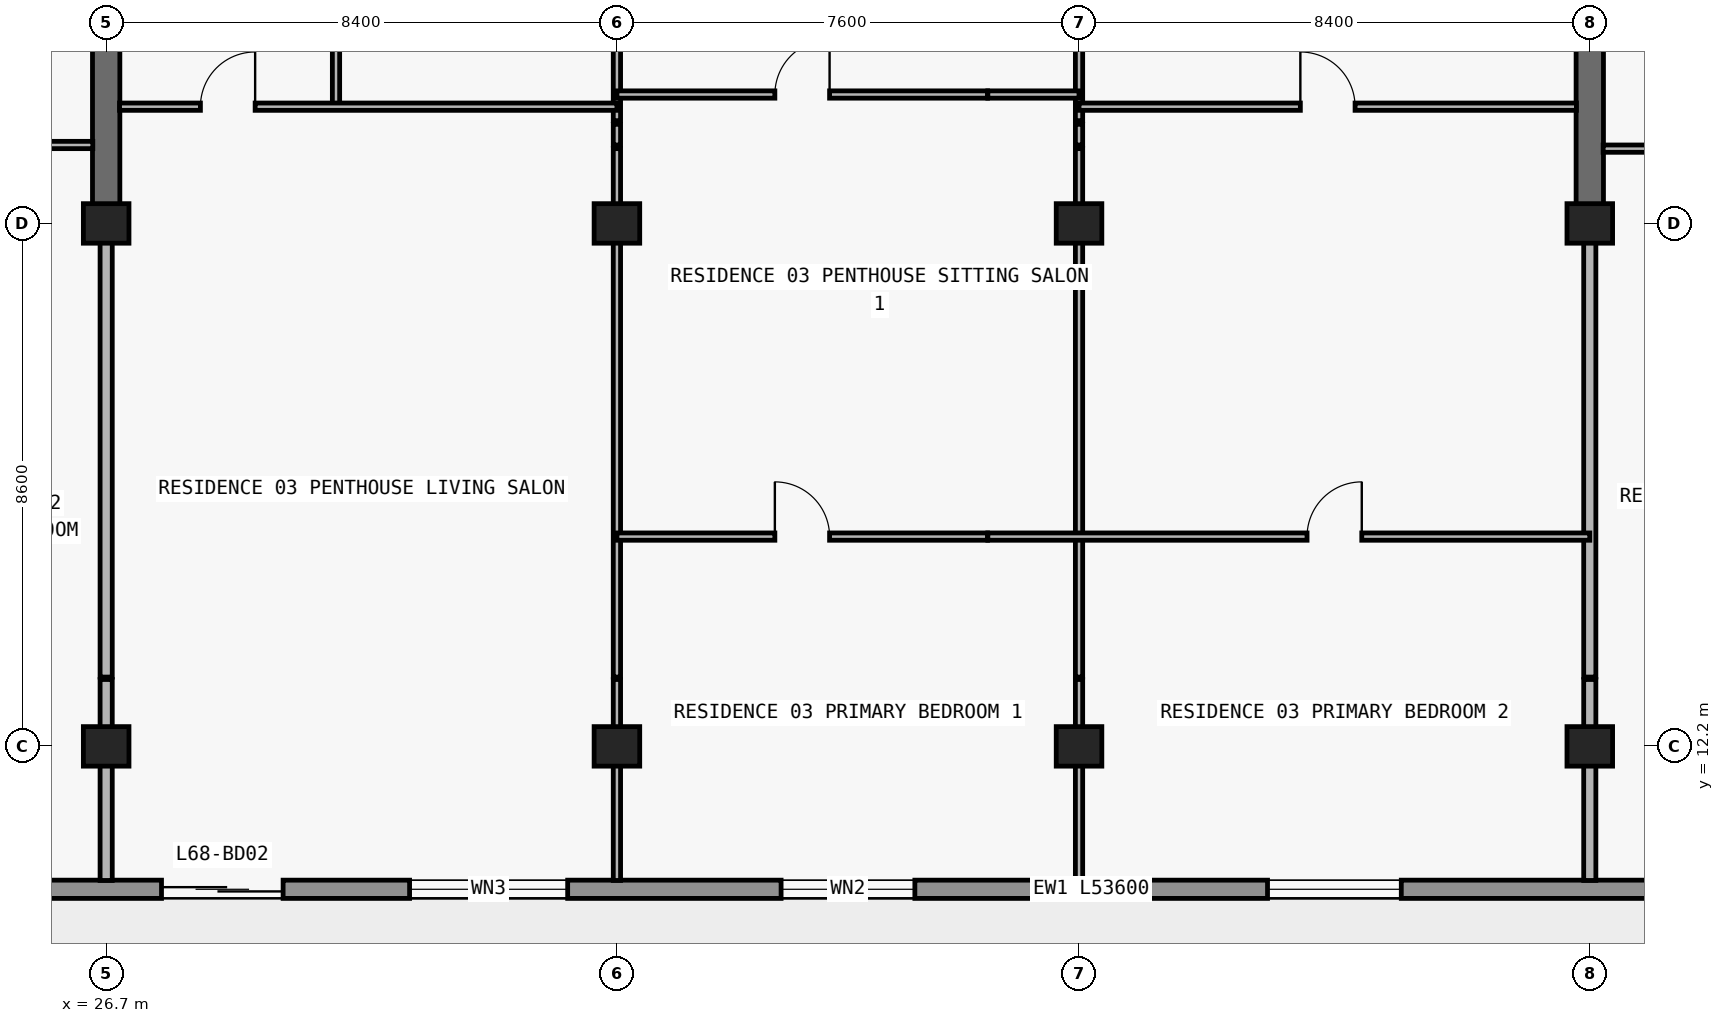
"""IFC4 building model, lengths in metres.
Left out: names, types, materials, properties, quantities, classifications, styles, units other than length and angle.
Written with IfcOpenShell. Run it as: python <this file> out.ifc"""

import sys

from ifc_helpers import new_model, si_unit, direction, frame, frame_2d, origin, origin_2d, place, context, subcontext, project, spatial, rectangle, extrude, element, fill, save


model = new_model("IFC4")
c1 = context("Model", 3, precision=1e-05, world=origin(), true_north=direction((0.0, 1.0)))
c2 = subcontext(c1, "Body", "Model", "MODEL_VIEW")
j1 = project(units=[si_unit("LENGTHUNIT", "METRE"), si_unit("PLANEANGLEUNIT", "RADIAN")], contexts=[c1])
p1 = place(None, origin())
s1 = spatial("IfcSite", under=j1, at=p1, CompositionType="ELEMENT")
p2 = place(p1, origin())
s2 = spatial("IfcBuilding", under=s1, at=p2, CompositionType="ELEMENT")
p3 = place(p2, frame((0.0, 0.0, 243.0)))
s3 = spatial("IfcBuildingStorey", under=s2, at=p3, CompositionType="ELEMENT", Elevation=243.0)
for number, where, z_axis, x_axis in (
    (1, (26.7, 12.2, 0.0), (0.0, 0.0, 1.0), (1.0, 0.0, 0.0)),
    (2, (35.1, 12.2, 0.0), (0.0, 0.0, 1.0), (1.0, 0.0, 0.0)),
    (3, (42.7, 12.2, 0.0), (0.0, 0.0, 1.0), (1.0, 0.0, 0.0)),
    (4, (51.1, 12.2, 0.0), (0.0, 0.0, 1.0), (1.0, 0.0, 0.0)),
    (5, (26.7, 20.8, 0.0), (0.0, 0.0, 1.0), (1.0, 0.0, 0.0)),
    (6, (35.1, 20.8, 0.0), (0.0, 0.0, 1.0), (1.0, 0.0, 0.0)),
    (7, (42.7, 20.8, 0.0), (0.0, 0.0, 1.0), (1.0, 0.0, 0.0)),
    (8, (51.1, 20.8, 0.0), (0.0, 0.0, 1.0), (1.0, 0.0, 0.0)),
):
    element("IfcColumn", number, at=place(p3, frame(where, z_axis=z_axis, x_axis=x_axis)), inside=s3, PredefinedType="COLUMN", context=c2, shape_type="SweptSolid", body=[
        extrude(rectangle(XDim=0.75, YDim=0.65, at=origin_2d()), origin(), (0.0, 0.0, 1.0), 3.05),
    ])
for number, where, z_axis, x_axis in (
    (9, (26.7, 20.8, 0.0), (0.0, 0.0, 1.0), (0.0, 1.0, 0.0)),
    (10, (51.1, 20.8, 0.0), (0.0, 0.0, 1.0), (0.0, 1.0, 0.0)),
):
    element("IfcWall", number, at=place(p3, frame(where, z_axis=z_axis, x_axis=x_axis)), inside=s3, PredefinedType="SHEAR", context=c2, shape_type="SweptSolid", body=[
        extrude(rectangle(XDim=8.6, YDim=0.45, at=frame_2d((4.3, 0.0))), origin(), (0.0, 0.0, 1.0), 3.05),
    ])
p4 = place(p3, frame((65.7, 9.85, 0.0), z_axis=(0.0, 0.0, 1.0), x_axis=(-1.0, 0.0, 0.0)))
e11 = element("IfcWall", 11, at=p4, inside=s3, PredefinedType="STANDARD", context=c2, shape_type="SweptSolid", body=[
    extrude(rectangle(XDim=53.6, YDim=0.3, at=frame_2d((26.8, 0.0))), origin(), (0.0, 0.0, 1.0), 3.05),
])
p5 = place(p4, frame((48.05, 0.0, 0.85)))
e12 = element("IfcOpeningElement", 12, at=p5, cuts=e11, PredefinedType="OPENING", context=c2, shape_type="SweptSolid", body=[
    extrude(rectangle(XDim=1.8, YDim=1.55, at=frame_2d((0.9, 0.775))), frame((0.0, 0.16, 0.0), z_axis=(0.0, -1.0, 0.0), x_axis=(1.0, 0.0, 0.0)), (0.0, 0.0, 1.0), 0.32),
])
p6 = place(p4, frame((44.09, 0.0, 0.0)))
e13 = element("IfcOpeningElement", 13, at=p6, cuts=e11, PredefinedType="OPENING", context=c2, shape_type="SweptSolid", body=[
    extrude(rectangle(XDim=2.0, YDim=2.3, at=frame_2d((1.0, 1.15))), frame((0.0, 0.16, 0.0), z_axis=(0.0, -1.0, 0.0), x_axis=(1.0, 0.0, 0.0)), (0.0, 0.0, 1.0), 0.32),
])
p7 = place(p4, frame((39.99, 0.0, 0.85)))
e14 = element("IfcOpeningElement", 14, at=p7, cuts=e11, PredefinedType="OPENING", context=c2, shape_type="SweptSolid", body=[
    extrude(rectangle(XDim=1.8, YDim=1.55, at=frame_2d((0.9, 0.775))), frame((0.0, 0.16, 0.0), z_axis=(0.0, -1.0, 0.0), x_axis=(1.0, 0.0, 0.0)), (0.0, 0.0, 1.0), 0.32),
])
p8 = place(p4, frame((36.09, 0.0, 0.0)))
e15 = element("IfcOpeningElement", 15, at=p8, cuts=e11, PredefinedType="OPENING", context=c2, shape_type="SweptSolid", body=[
    extrude(rectangle(XDim=2.0, YDim=2.3, at=frame_2d((1.0, 1.15))), frame((0.0, 0.16, 0.0), z_axis=(0.0, -1.0, 0.0), x_axis=(1.0, 0.0, 0.0)), (0.0, 0.0, 1.0), 0.32),
])
p9 = place(p4, frame((31.41, 0.0, 0.65)))
e16 = element("IfcOpeningElement", 16, at=p9, cuts=e11, PredefinedType="OPENING", context=c2, shape_type="SweptSolid", body=[
    extrude(rectangle(XDim=2.6, YDim=1.85, at=frame_2d((1.3, 0.925))), frame((0.0, 0.16, 0.0), z_axis=(0.0, -1.0, 0.0), x_axis=(1.0, 0.0, 0.0)), (0.0, 0.0, 1.0), 0.32),
])
p10 = place(p4, frame((25.7, 0.0, 0.85)))
e17 = element("IfcOpeningElement", 17, at=p10, cuts=e11, PredefinedType="OPENING", context=c2, shape_type="SweptSolid", body=[
    extrude(rectangle(XDim=2.2, YDim=1.55, at=frame_2d((1.1, 0.775))), frame((0.0, 0.16, 0.0), z_axis=(0.0, -1.0, 0.0), x_axis=(1.0, 0.0, 0.0)), (0.0, 0.0, 1.0), 0.32),
])
p11 = place(p4, frame((17.7, 0.0, 0.85)))
e18 = element("IfcOpeningElement", 18, at=p11, cuts=e11, PredefinedType="OPENING", context=c2, shape_type="SweptSolid", body=[
    extrude(rectangle(XDim=2.2, YDim=1.55, at=frame_2d((1.1, 0.775))), frame((0.0, 0.16, 0.0), z_axis=(0.0, -1.0, 0.0), x_axis=(1.0, 0.0, 0.0)), (0.0, 0.0, 1.0), 0.32),
])
p12 = place(p4, frame((11.29, 0.0, 0.0)))
e19 = element("IfcOpeningElement", 19, at=p12, cuts=e11, PredefinedType="OPENING", context=c2, shape_type="SweptSolid", body=[
    extrude(rectangle(XDim=2.0, YDim=2.3, at=frame_2d((1.0, 1.15))), frame((0.0, 0.16, 0.0), z_axis=(0.0, -1.0, 0.0), x_axis=(1.0, 0.0, 0.0)), (0.0, 0.0, 1.0), 0.32),
])
p13 = place(p4, frame((7.19, 0.0, 0.85)))
e20 = element("IfcOpeningElement", 20, at=p13, cuts=e11, PredefinedType="OPENING", context=c2, shape_type="SweptSolid", body=[
    extrude(rectangle(XDim=1.8, YDim=1.55, at=frame_2d((0.9, 0.775))), frame((0.0, 0.16, 0.0), z_axis=(0.0, -1.0, 0.0), x_axis=(1.0, 0.0, 0.0)), (0.0, 0.0, 1.0), 0.32),
])
p14 = place(p4, frame((0.65, 0.0, 0.85)))
e21 = element("IfcOpeningElement", 21, at=p14, cuts=e11, PredefinedType="OPENING", context=c2, shape_type="SweptSolid", body=[
    extrude(rectangle(XDim=1.8, YDim=1.55, at=frame_2d((0.9, 0.775))), frame((0.0, 0.16, 0.0), z_axis=(0.0, -1.0, 0.0), x_axis=(1.0, 0.0, 0.0)), (0.0, 0.0, 1.0), 0.32),
])
p15 = place(p3, frame((26.7, 9.995, 0.0), z_axis=(0.0, 0.0, 1.0), x_axis=(0.0, 1.0, 0.0)))
e22 = element("IfcWall", 22, at=p15, inside=s3, PredefinedType="PARTITIONING", context=c2, shape_type="SweptSolid", body=[
    extrude(rectangle(XDim=3.305, YDim=0.2, at=frame_2d((1.652, 0.0))), origin(), (0.0, 0.0, 1.0), 2.263),
])
p16 = place(p3, frame((26.7, 13.34, 0.0), z_axis=(0.0, 0.0, 1.0), x_axis=(0.0, 1.0, 0.0)))
e23 = element("IfcWall", 23, at=p16, inside=s3, PredefinedType="PARTITIONING", context=c2, shape_type="SweptSolid", body=[
    extrude(rectangle(XDim=7.455, YDim=0.2, at=frame_2d((3.728, 0.0))), origin(), (0.0, 0.0, 1.0), 2.263),
])
p17 = place(p3, frame((30.48, 22.72, 0.0), z_axis=(0.0, 0.0, 1.0), x_axis=(0.0, 1.0, 0.0)))
e24 = element("IfcWall", 24, at=p17, inside=s3, PredefinedType="PARTITIONING", context=c2, shape_type="SweptSolid", body=[
    extrude(rectangle(XDim=4.46, YDim=0.12, at=frame_2d((2.23, 0.0))), origin(), (0.0, 0.0, 1.0), 3.05),
])
p18 = place(p17, frame((1.78, 0.0, 0.0)))
e25 = element("IfcOpeningElement", 25, at=p18, cuts=e24, PredefinedType="OPENING", context=c2, shape_type="SweptSolid", body=[
    extrude(rectangle(XDim=0.9, YDim=2.15, at=frame_2d((0.45, 1.075))), frame((0.0, 0.07, 0.0), z_axis=(0.0, -1.0, 0.0), x_axis=(1.0, 0.0, 0.0)), (0.0, 0.0, 1.0), 0.14),
])
p19 = place(p3, frame((35.1, 9.995, 0.0), z_axis=(0.0, 0.0, 1.0), x_axis=(0.0, 1.0, 0.0)))
e26 = element("IfcWall", 26, at=p19, inside=s3, PredefinedType="PARTITIONING", context=c2, shape_type="SweptSolid", body=[
    extrude(rectangle(XDim=3.305, YDim=0.12, at=frame_2d((1.652, 0.0))), origin(), (0.0, 0.0, 1.0), 2.263),
])
p20 = place(p3, frame((35.1, 13.34, 0.0), z_axis=(0.0, 0.0, 1.0), x_axis=(0.0, 1.0, 0.0)))
e27 = element("IfcWall", 27, at=p20, inside=s3, PredefinedType="PARTITIONING", context=c2, shape_type="SweptSolid", body=[
    extrude(rectangle(XDim=8.69, YDim=0.12, at=frame_2d((4.345, 0.0))), origin(), (0.0, 0.0, 1.0), 2.263),
])
p21 = place(p3, frame((35.1, 22.09, 0.0), z_axis=(0.0, 0.0, 1.0), x_axis=(0.0, 1.0, 0.0)))
e28 = element("IfcWall", 28, at=p21, inside=s3, PredefinedType="PARTITIONING", context=c2, shape_type="SweptSolid", body=[
    extrude(rectangle(XDim=0.34, YDim=0.12, at=frame_2d((0.17, 0.0))), origin(), (0.0, 0.0, 1.0), 2.263),
])
p22 = place(p3, frame((35.1, 22.49, 0.0), z_axis=(0.0, 0.0, 1.0), x_axis=(0.0, 1.0, 0.0)))
e29 = element("IfcWall", 29, at=p22, inside=s3, PredefinedType="PARTITIONING", context=c2, shape_type="SweptSolid", body=[
    extrude(rectangle(XDim=4.69, YDim=0.12, at=frame_2d((2.345, 0.0))), origin(), (0.0, 0.0, 1.0), 2.263),
])
p23 = place(p22, frame((2.11, 0.0, 0.0)))
e30 = element("IfcOpeningElement", 30, at=p23, cuts=e29, PredefinedType="OPENING", context=c2, shape_type="SweptSolid", body=[
    extrude(rectangle(XDim=0.9, YDim=2.15, at=frame_2d((0.45, 1.075))), frame((0.0, 0.07, 0.0), z_axis=(0.0, -1.0, 0.0), x_axis=(1.0, 0.0, 0.0)), (0.0, 0.0, 1.0), 0.14),
])
p24 = place(p3, frame((42.7, 9.995, 0.0), z_axis=(0.0, 0.0, 1.0), x_axis=(0.0, 1.0, 0.0)))
e31 = element("IfcWall", 31, at=p24, inside=s3, PredefinedType="PARTITIONING", context=c2, shape_type="SweptSolid", body=[
    extrude(rectangle(XDim=3.305, YDim=0.12, at=frame_2d((1.652, 0.0))), origin(), (0.0, 0.0, 1.0), 2.263),
])
p25 = place(p3, frame((42.7, 13.34, 0.0), z_axis=(0.0, 0.0, 1.0), x_axis=(0.0, 1.0, 0.0)))
e32 = element("IfcWall", 32, at=p25, inside=s3, PredefinedType="PARTITIONING", context=c2, shape_type="SweptSolid", body=[
    extrude(rectangle(XDim=8.69, YDim=0.12, at=frame_2d((4.345, 0.0))), origin(), (0.0, 0.0, 1.0), 2.263),
])
p26 = place(p3, frame((42.7, 22.09, 0.0), z_axis=(0.0, 0.0, 1.0), x_axis=(0.0, 1.0, 0.0)))
e33 = element("IfcWall", 33, at=p26, inside=s3, PredefinedType="PARTITIONING", context=c2, shape_type="SweptSolid", body=[
    extrude(rectangle(XDim=0.34, YDim=0.12, at=frame_2d((0.17, 0.0))), origin(), (0.0, 0.0, 1.0), 2.263),
])
p27 = place(p3, frame((42.7, 22.49, 0.0), z_axis=(0.0, 0.0, 1.0), x_axis=(0.0, 1.0, 0.0)))
e34 = element("IfcWall", 34, at=p27, inside=s3, PredefinedType="PARTITIONING", context=c2, shape_type="SweptSolid", body=[
    extrude(rectangle(XDim=4.69, YDim=0.12, at=frame_2d((2.345, 0.0))), origin(), (0.0, 0.0, 1.0), 2.263),
])
p28 = place(p27, frame((2.11, 0.0, 0.0)))
e35 = element("IfcOpeningElement", 35, at=p28, cuts=e34, PredefinedType="OPENING", context=c2, shape_type="SweptSolid", body=[
    extrude(rectangle(XDim=0.9, YDim=2.15, at=frame_2d((0.45, 1.075))), frame((0.0, 0.07, 0.0), z_axis=(0.0, -1.0, 0.0), x_axis=(1.0, 0.0, 0.0)), (0.0, 0.0, 1.0), 0.14),
])
p29 = place(p3, frame((51.1, 9.995, 0.0), z_axis=(0.0, 0.0, 1.0), x_axis=(0.0, 1.0, 0.0)))
e36 = element("IfcWall", 36, at=p29, inside=s3, PredefinedType="PARTITIONING", context=c2, shape_type="SweptSolid", body=[
    extrude(rectangle(XDim=3.305, YDim=0.2, at=frame_2d((1.652, 0.0))), origin(), (0.0, 0.0, 1.0), 2.263),
])
p30 = place(p3, frame((51.1, 13.34, 0.0), z_axis=(0.0, 0.0, 1.0), x_axis=(0.0, 1.0, 0.0)))
e37 = element("IfcWall", 37, at=p30, inside=s3, PredefinedType="PARTITIONING", context=c2, shape_type="SweptSolid", body=[
    extrude(rectangle(XDim=7.455, YDim=0.2, at=frame_2d((3.728, 0.0))), origin(), (0.0, 0.0, 1.0), 2.263),
])
p31 = place(p3, frame((35.1, 15.65, 0.0), z_axis=(0.0, 0.0, 1.0), x_axis=(1.0, 0.0, 0.0)))
e38 = element("IfcWall", 38, at=p31, inside=s3, PredefinedType="PARTITIONING", context=c2, shape_type="SweptSolid", body=[
    extrude(rectangle(XDim=6.095, YDim=0.12, at=frame_2d((3.047, 0.0))), origin(), (0.0, 0.0, 1.0), 3.05),
])
p32 = place(p31, frame((2.597, 0.0, 0.0)))
e39 = element("IfcOpeningElement", 39, at=p32, cuts=e38, PredefinedType="OPENING", context=c2, shape_type="SweptSolid", body=[
    extrude(rectangle(XDim=0.9, YDim=2.15, at=frame_2d((0.45, 1.075))), frame((0.0, 0.07, 0.0), z_axis=(0.0, -1.0, 0.0), x_axis=(1.0, 0.0, 0.0)), (0.0, 0.0, 1.0), 0.14),
])
p33 = place(p3, frame((41.2, 15.65, 0.0), z_axis=(0.0, 0.0, 1.0), x_axis=(1.0, 0.0, 0.0)))
e40 = element("IfcWall", 40, at=p33, inside=s3, PredefinedType="PARTITIONING", context=c2, shape_type="SweptSolid", body=[
    extrude(rectangle(XDim=9.9, YDim=0.12, at=frame_2d((4.95, 0.0))), origin(), (0.0, 0.0, 1.0), 3.05),
])
p34 = place(p33, frame((5.25, 0.0, 0.0)))
e41 = element("IfcOpeningElement", 41, at=p34, cuts=e40, PredefinedType="OPENING", context=c2, shape_type="SweptSolid", body=[
    extrude(rectangle(XDim=0.9, YDim=2.15, at=frame_2d((0.45, 1.075))), frame((0.0, 0.07, 0.0), z_axis=(0.0, -1.0, 0.0), x_axis=(1.0, 0.0, 0.0)), (0.0, 0.0, 1.0), 0.14),
])
p35 = place(p3, frame((51.32, 22.03, 0.0), z_axis=(0.0, 0.0, 1.0), x_axis=(1.0, 0.0, 0.0)))
e42 = element("IfcWall", 42, at=p35, inside=s3, PredefinedType="PARTITIONING", context=c2, shape_type="SweptSolid", body=[
    extrude(rectangle(XDim=8.18, YDim=0.12, at=frame_2d((4.09, 0.0))), origin(), (0.0, 0.0, 1.0), 3.05),
])
p36 = place(p35, frame((1.583, 0.0, 0.0)))
e43 = element("IfcOpeningElement", 43, at=p36, cuts=e42, PredefinedType="OPENING", context=c2, shape_type="SweptSolid", body=[
    extrude(rectangle(XDim=0.9, YDim=2.15, at=frame_2d((0.45, 1.075))), frame((0.0, 0.07, 0.0), z_axis=(0.0, -1.0, 0.0), x_axis=(1.0, 0.0, 0.0)), (0.0, 0.0, 1.0), 0.14),
])
p37 = place(p35, frame((5.84, 0.0, 0.0)))
e44 = element("IfcOpeningElement", 44, at=p37, cuts=e42, PredefinedType="OPENING", context=c2, shape_type="SweptSolid", body=[
    extrude(rectangle(XDim=0.9, YDim=2.15, at=frame_2d((0.45, 1.075))), frame((0.0, 0.07, 0.0), z_axis=(0.0, -1.0, 0.0), x_axis=(1.0, 0.0, 0.0)), (0.0, 0.0, 1.0), 0.14),
])
p38 = place(p3, frame((18.3, 22.09, 0.0), z_axis=(0.0, 0.0, 1.0), x_axis=(1.0, 0.0, 0.0)))
e45 = element("IfcWall", 45, at=p38, inside=s3, PredefinedType="PARTITIONING", context=c2, shape_type="SweptSolid", body=[
    extrude(rectangle(XDim=8.18, YDim=0.12, at=frame_2d((4.09, 0.0))), origin(), (0.0, 0.0, 1.0), 3.05),
])
p39 = place(p38, frame((1.818, 0.0, 0.0)))
e46 = element("IfcOpeningElement", 46, at=p39, cuts=e45, PredefinedType="OPENING", context=c2, shape_type="SweptSolid", body=[
    extrude(rectangle(XDim=0.9, YDim=2.15, at=frame_2d((0.45, 1.075))), frame((0.0, 0.07, 0.0), z_axis=(0.0, -1.0, 0.0), x_axis=(1.0, 0.0, 0.0)), (0.0, 0.0, 1.0), 0.14),
])
p40 = place(p38, frame((5.95, 0.0, 0.0)))
e47 = element("IfcOpeningElement", 47, at=p40, cuts=e45, PredefinedType="OPENING", context=c2, shape_type="SweptSolid", body=[
    extrude(rectangle(XDim=0.9, YDim=2.15, at=frame_2d((0.45, 1.075))), frame((0.0, 0.07, 0.0), z_axis=(0.0, -1.0, 0.0), x_axis=(1.0, 0.0, 0.0)), (0.0, 0.0, 1.0), 0.14),
])
p41 = place(p3, frame((26.92, 22.72, 0.0), z_axis=(0.0, 0.0, 1.0), x_axis=(1.0, 0.0, 0.0)))
e48 = element("IfcWall", 48, at=p41, inside=s3, PredefinedType="PARTITIONING", context=c2, shape_type="SweptSolid", body=[
    extrude(rectangle(XDim=8.18, YDim=0.12, at=frame_2d((4.09, 0.0))), origin(), (0.0, 0.0, 1.0), 3.05),
])
p42 = place(p41, frame((1.33, 0.0, 0.0)))
e49 = element("IfcOpeningElement", 49, at=p42, cuts=e48, PredefinedType="OPENING", context=c2, shape_type="SweptSolid", body=[
    extrude(rectangle(XDim=0.9, YDim=2.15, at=frame_2d((0.45, 1.075))), frame((0.0, 0.07, 0.0), z_axis=(0.0, -1.0, 0.0), x_axis=(1.0, 0.0, 0.0)), (0.0, 0.0, 1.0), 0.14),
])
p43 = place(p3, frame((42.7, 22.72, 0.0), z_axis=(0.0, 0.0, 1.0), x_axis=(1.0, 0.0, 0.0)))
e50 = element("IfcWall", 50, at=p43, inside=s3, PredefinedType="PARTITIONING", context=c2, shape_type="SweptSolid", body=[
    extrude(rectangle(XDim=8.18, YDim=0.12, at=frame_2d((4.09, 0.0))), origin(), (0.0, 0.0, 1.0), 3.05),
])
p44 = place(p43, frame((3.64, 0.0, 0.0)))
e51 = element("IfcOpeningElement", 51, at=p44, cuts=e50, PredefinedType="OPENING", context=c2, shape_type="SweptSolid", body=[
    extrude(rectangle(XDim=0.9, YDim=2.15, at=frame_2d((0.45, 1.075))), frame((0.0, 0.07, 0.0), z_axis=(0.0, -1.0, 0.0), x_axis=(1.0, 0.0, 0.0)), (0.0, 0.0, 1.0), 0.14),
])
p45 = place(p3, frame((35.1, 22.92, 0.0), z_axis=(0.0, 0.0, 1.0), x_axis=(1.0, 0.0, 0.0)))
e52 = element("IfcWall", 52, at=p45, inside=s3, PredefinedType="PARTITIONING", context=c2, shape_type="SweptSolid", body=[
    extrude(rectangle(XDim=6.095, YDim=0.12, at=frame_2d((3.047, 0.0))), origin(), (0.0, 0.0, 1.0), 3.05),
])
p46 = place(p45, frame((2.597, 0.0, 0.0)))
e53 = element("IfcOpeningElement", 53, at=p46, cuts=e52, PredefinedType="OPENING", context=c2, shape_type="SweptSolid", body=[
    extrude(rectangle(XDim=0.9, YDim=2.15, at=frame_2d((0.45, 1.075))), frame((0.0, 0.07, 0.0), z_axis=(0.0, -1.0, 0.0), x_axis=(1.0, 0.0, 0.0)), (0.0, 0.0, 1.0), 0.14),
])
p47 = place(p3, frame((41.2, 22.92, 0.0), z_axis=(0.0, 0.0, 1.0), x_axis=(1.0, 0.0, 0.0)))
e54 = element("IfcWall", 54, at=p47, inside=s3, PredefinedType="PARTITIONING", context=c2, shape_type="SweptSolid", body=[
    extrude(rectangle(XDim=1.5, YDim=0.12, at=frame_2d((0.75, 0.0))), origin(), (0.0, 0.0, 1.0), 3.05),
])
p48 = place(p8, origin())
e55 = element("IfcDoor", 55, at=p48, inside=s3, OperationType="DOUBLE_DOOR_SLIDING", PredefinedType="DOOR", context=c2, shape_type="SweptSolid", body=[
    extrude(rectangle(XDim=2.0, YDim=2.3, at=frame_2d((1.0, 1.15))), frame((0.0, 0.025, 0.0), z_axis=(0.0, -1.0, 0.0), x_axis=(1.0, 0.0, 0.0)), (0.0, 0.0, 1.0), 0.05),
])
fill(e15, e55)
p49 = place(p9, origin())
e56 = element("IfcWindow", 56, at=p49, inside=s3, PartitioningType="SINGLE_PANEL", PredefinedType="WINDOW", context=c2, shape_type="SweptSolid", body=[
    extrude(rectangle(XDim=2.6, YDim=1.85, at=frame_2d((1.3, 0.925))), frame((0.0, 0.03, 0.0), z_axis=(0.0, -1.0, 0.0), x_axis=(1.0, 0.0, 0.0)), (0.0, 0.0, 1.0), 0.06),
])
fill(e16, e56)
p50 = place(p10, origin())
e57 = element("IfcWindow", 57, at=p50, inside=s3, PartitioningType="SINGLE_PANEL", PredefinedType="WINDOW", context=c2, shape_type="SweptSolid", body=[
    extrude(rectangle(XDim=2.2, YDim=1.55, at=frame_2d((1.1, 0.775))), frame((0.0, 0.03, 0.0), z_axis=(0.0, -1.0, 0.0), x_axis=(1.0, 0.0, 0.0)), (0.0, 0.0, 1.0), 0.06),
])
fill(e17, e57)
p51 = place(p11, origin())
e58 = element("IfcWindow", 58, at=p51, inside=s3, PartitioningType="SINGLE_PANEL", PredefinedType="WINDOW", context=c2, shape_type="SweptSolid", body=[
    extrude(rectangle(XDim=2.2, YDim=1.55, at=frame_2d((1.1, 0.775))), frame((0.0, 0.03, 0.0), z_axis=(0.0, -1.0, 0.0), x_axis=(1.0, 0.0, 0.0)), (0.0, 0.0, 1.0), 0.06),
])
fill(e18, e58)
p52 = place(p42, origin())
e59 = element("IfcDoor", 59, at=p52, inside=s3, OperationType="SINGLE_SWING_RIGHT", PredefinedType="DOOR", context=c2, shape_type="SweptSolid", body=[
    extrude(rectangle(XDim=0.9, YDim=2.15, at=frame_2d((0.45, 1.075))), frame((0.0, 0.025, 0.0), z_axis=(0.0, -1.0, 0.0), x_axis=(1.0, 0.0, 0.0)), (0.0, 0.0, 1.0), 0.05),
])
fill(e49, e59)
p53 = place(p46, origin())
e60 = element("IfcDoor", 60, at=p53, inside=s3, OperationType="SINGLE_SWING_RIGHT", PredefinedType="DOOR", context=c2, shape_type="SweptSolid", body=[
    extrude(rectangle(XDim=0.9, YDim=2.15, at=frame_2d((0.45, 1.075))), frame((0.0, 0.025, 0.0), z_axis=(0.0, -1.0, 0.0), x_axis=(1.0, 0.0, 0.0)), (0.0, 0.0, 1.0), 0.05),
])
fill(e53, e60)
p54 = place(p32, origin())
e61 = element("IfcDoor", 61, at=p54, inside=s3, OperationType="SINGLE_SWING_LEFT", PredefinedType="DOOR", context=c2, shape_type="SweptSolid", body=[
    extrude(rectangle(XDim=0.9, YDim=2.15, at=frame_2d((0.45, 1.075))), frame((0.0, 0.025, 0.0), z_axis=(0.0, -1.0, 0.0), x_axis=(1.0, 0.0, 0.0)), (0.0, 0.0, 1.0), 0.05),
])
fill(e39, e61)
p55 = place(p44, origin())
e62 = element("IfcDoor", 62, at=p55, inside=s3, OperationType="SINGLE_SWING_LEFT", PredefinedType="DOOR", context=c2, shape_type="SweptSolid", body=[
    extrude(rectangle(XDim=0.9, YDim=2.15, at=frame_2d((0.45, 1.075))), frame((0.0, 0.025, 0.0), z_axis=(0.0, -1.0, 0.0), x_axis=(1.0, 0.0, 0.0)), (0.0, 0.0, 1.0), 0.05),
])
fill(e51, e62)
p56 = place(p34, origin())
e63 = element("IfcDoor", 63, at=p56, inside=s3, OperationType="SINGLE_SWING_RIGHT", PredefinedType="DOOR", context=c2, shape_type="SweptSolid", body=[
    extrude(rectangle(XDim=0.9, YDim=2.15, at=frame_2d((0.45, 1.075))), frame((0.0, 0.025, 0.0), z_axis=(0.0, -1.0, 0.0), x_axis=(1.0, 0.0, 0.0)), (0.0, 0.0, 1.0), 0.05),
])
fill(e41, e63)
save(model, sys.argv[1])
